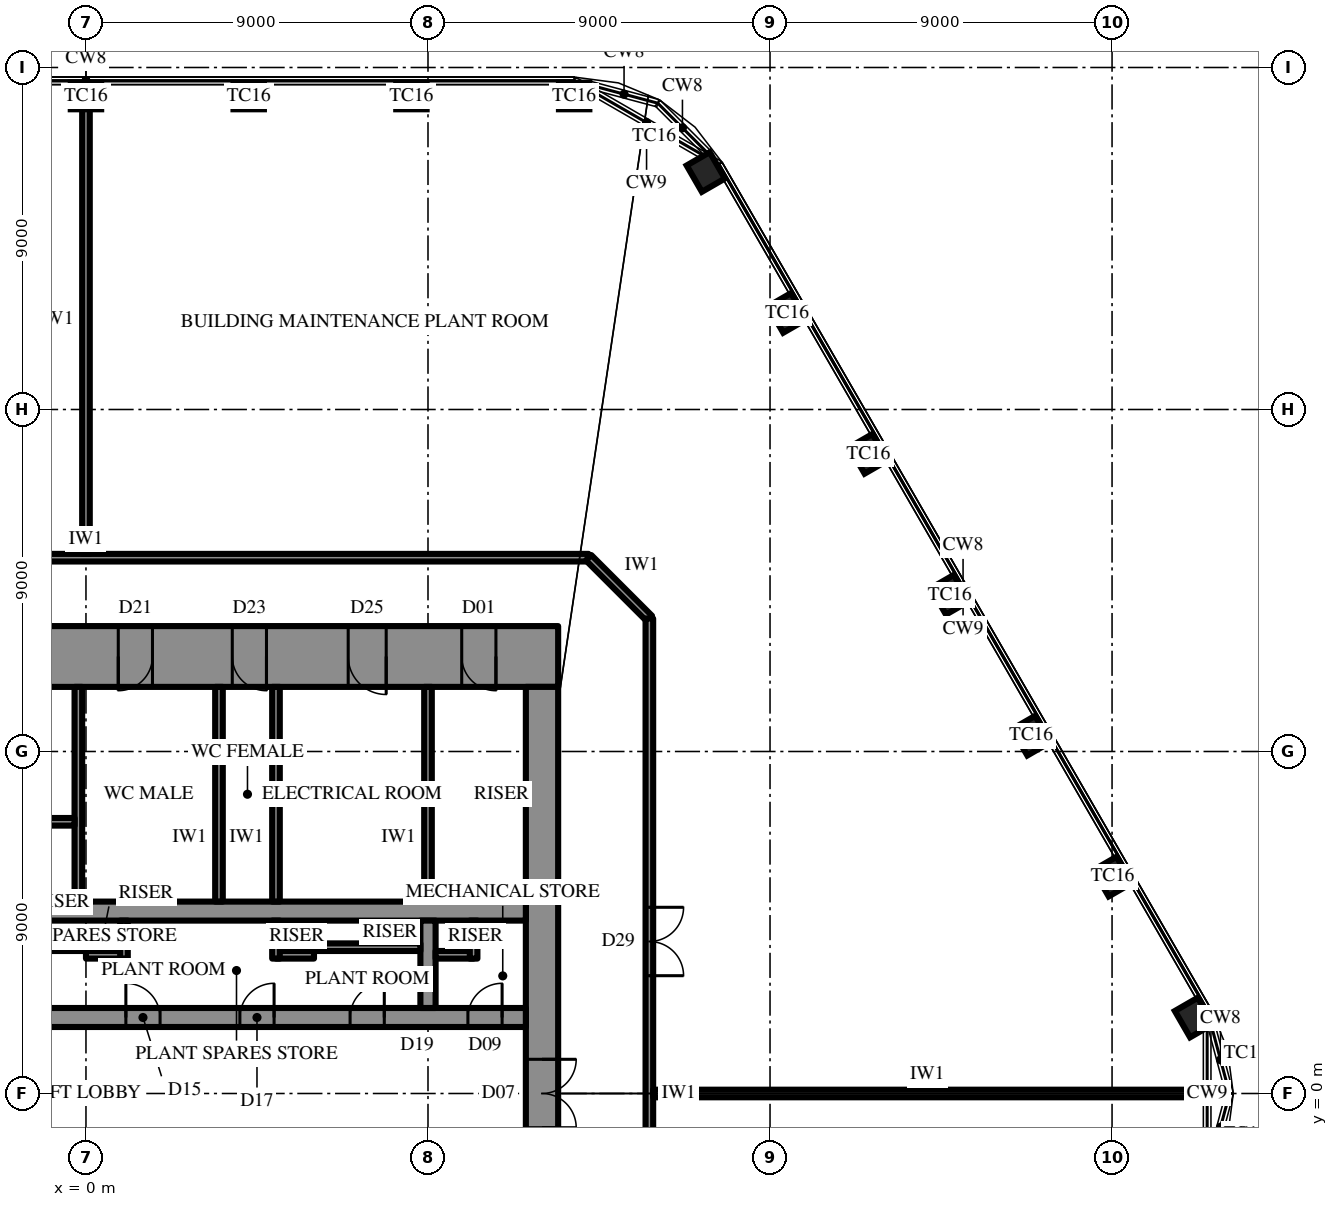
"""IFC4 building model, lengths in metres.
Left out: names, types, materials, properties, quantities, classifications, styles, units other than length and angle.
Written with IfcOpenShell. Run it as: python <this file> out.ifc"""

import sys

from ifc_helpers import new_model, si_unit, direction, frame, frame_2d, origin, origin_2d, place, context, subcontext, project, spatial, rectangle, extrude, element, fill, save


model = new_model("IFC4")
c1 = context("Model", 3, precision=1e-05, world=origin(), true_north=direction((0.0, 1.0)))
c2 = subcontext(c1, "Body", "Model", "MODEL_VIEW")
j1 = project(units=[si_unit("LENGTHUNIT", "METRE"), si_unit("PLANEANGLEUNIT", "RADIAN")], contexts=[c1])
p1 = place(None, origin())
s1 = spatial("IfcSite", under=j1, at=p1, CompositionType="ELEMENT")
p2 = place(p1, origin())
s2 = spatial("IfcBuilding", under=s1, at=p2, CompositionType="ELEMENT")
p3 = place(p2, frame((0.0, 0.0, 402.3)))
s3 = spatial("IfcBuildingStorey", under=s2, at=p3, CompositionType="ELEMENT", Elevation=402.3)
for number, where, z_axis, x_axis in (
    (1, (29.156, 2.0, 0.0), (0.0, 0.0, 1.0), (-0.5, 0.866, 0.0)),
    (2, (27.015, 5.708, 0.0), (0.0, 0.0, 1.0), (-0.5, 0.866, 0.0)),
    (3, (24.874, 9.417, 0.0), (0.0, 0.0, 1.0), (-0.5, 0.866, 0.0)),
    (4, (22.733, 13.125, 0.0), (0.0, 0.0, 1.0), (-0.5, 0.866, 0.0)),
    (5, (20.592, 16.833, 0.0), (0.0, 0.0, 1.0), (-0.5, 0.866, 0.0)),
    (6, (18.451, 20.542, 0.0), (0.0, 0.0, 1.0), (-0.5, 0.866, 0.0)),
    (7, (16.31, 24.25, 0.0), (0.0, 0.0, 1.0), (-0.5, 0.866, 0.0)),
    (8, (12.846, 26.25, 0.0), (0.0, 0.0, 1.0), (-1.0, 0.0, 0.0)),
    (9, (8.564, 26.25, 0.0), (0.0, 0.0, 1.0), (-1.0, 0.0, 0.0)),
    (10, (4.282, 26.25, 0.0), (0.0, 0.0, 1.0), (-1.0, 0.0, 0.0)),
    (11, (0.0, 26.25, 0.0), (0.0, 0.0, 1.0), (-1.0, 0.0, 0.0)),
):
    element("IfcColumn", number, at=place(p3, frame(where, z_axis=z_axis, x_axis=x_axis)), inside=s3, PredefinedType="COLUMN", context=c2, shape_type="SweptSolid", body=[
        extrude(rectangle(XDim=0.8, YDim=0.7, at=origin_2d()), origin(), (0.0, 0.0, 1.0), 6.0),
    ])
p4 = place(p3, frame((-12.425, 11.5, 0.0), z_axis=(0.0, 0.0, 1.0), x_axis=(1.0, 0.0, 0.0)))
e12 = element("IfcWall", 12, at=p4, inside=s3, PredefinedType="SHEAR", context=c2, shape_type="SweptSolid", body=[
    extrude(rectangle(XDim=24.85, YDim=1.6, at=frame_2d((12.425, 0.0))), origin(), (0.0, 0.0, 1.0), 6.0),
])
p5 = place(p4, frame((13.275, 0.0, 0.0)))
e13 = element("IfcOpeningElement", 13, at=p5, cuts=e12, PredefinedType="OPENING", context=c2, shape_type="SweptSolid", body=[
    extrude(rectangle(XDim=0.9, YDim=2.2, at=frame_2d((0.45, 1.1))), frame((0.0, 0.81, 0.0), z_axis=(0.0, -1.0, 0.0), x_axis=(1.0, 0.0, 0.0)), (0.0, 0.0, 1.0), 1.62),
])
p6 = place(p4, frame((16.275, 0.0, 0.0)))
e14 = element("IfcOpeningElement", 14, at=p6, cuts=e12, PredefinedType="OPENING", context=c2, shape_type="SweptSolid", body=[
    extrude(rectangle(XDim=0.9, YDim=2.2, at=frame_2d((0.45, 1.1))), frame((0.0, 0.81, 0.0), z_axis=(0.0, -1.0, 0.0), x_axis=(1.0, 0.0, 0.0)), (0.0, 0.0, 1.0), 1.62),
])
p7 = place(p4, frame((19.325, 0.0, 0.0)))
e15 = element("IfcOpeningElement", 15, at=p7, cuts=e12, PredefinedType="OPENING", context=c2, shape_type="SweptSolid", body=[
    extrude(rectangle(XDim=1.0, YDim=2.2, at=frame_2d((0.5, 1.1))), frame((0.0, 0.81, 0.0), z_axis=(0.0, -1.0, 0.0), x_axis=(1.0, 0.0, 0.0)), (0.0, 0.0, 1.0), 1.62),
])
p8 = place(p4, frame((1.637, 0.0, 0.0)))
e16 = element("IfcOpeningElement", 16, at=p8, cuts=e12, PredefinedType="OPENING", context=c2, shape_type="SweptSolid", body=[
    extrude(rectangle(XDim=0.9, YDim=2.2, at=frame_2d((0.45, 1.1))), frame((0.0, 0.81, 0.0), z_axis=(0.0, -1.0, 0.0), x_axis=(1.0, 0.0, 0.0)), (0.0, 0.0, 1.0), 1.62),
])
p9 = place(p4, frame((22.312, 0.0, 0.0)))
e17 = element("IfcOpeningElement", 17, at=p9, cuts=e12, PredefinedType="OPENING", context=c2, shape_type="SweptSolid", body=[
    extrude(rectangle(XDim=0.9, YDim=2.2, at=frame_2d((0.45, 1.1))), frame((0.0, 0.81, 0.0), z_axis=(0.0, -1.0, 0.0), x_axis=(1.0, 0.0, 0.0)), (0.0, 0.0, 1.0), 1.62),
])
p10 = place(p3, frame((12.0, -10.7, 0.0), z_axis=(0.0, 0.0, 1.0), x_axis=(0.0, 1.0, 0.0)))
e18 = element("IfcWall", 18, at=p10, inside=s3, PredefinedType="SHEAR", context=c2, shape_type="SweptSolid", body=[
    extrude(rectangle(XDim=21.4, YDim=0.85, at=frame_2d((10.7, 0.0))), origin(), (0.0, 0.0, 1.0), 6.0),
])
p11 = place(p10, frame((9.8, 0.0, 0.0)))
e19 = element("IfcOpeningElement", 19, at=p11, cuts=e18, PredefinedType="OPENING", context=c2, shape_type="SweptSolid", body=[
    extrude(rectangle(XDim=1.8, YDim=2.4, at=frame_2d((0.9, 1.2))), frame((0.0, 0.435, 0.0), z_axis=(0.0, -1.0, 0.0), x_axis=(1.0, 0.0, 0.0)), (0.0, 0.0, 1.0), 0.87),
])
p12 = place(p3, frame((-3.2, 2.0, 0.0), z_axis=(0.0, 0.0, 1.0), x_axis=(1.0, 0.0, 0.0)))
e20 = element("IfcWall", 20, at=p12, inside=s3, PredefinedType="SHEAR", context=c2, shape_type="SweptSolid", body=[
    extrude(rectangle(XDim=14.775, YDim=0.5, at=frame_2d((7.387, 0.0))), origin(), (0.0, 0.0, 1.0), 6.0),
])
p13 = place(p12, frame((1.35, 0.0, 0.0)))
e21 = element("IfcOpeningElement", 21, at=p13, cuts=e20, PredefinedType="OPENING", context=c2, shape_type="SweptSolid", body=[
    extrude(rectangle(XDim=0.9, YDim=2.2, at=frame_2d((0.45, 1.1))), frame((0.0, 0.26, 0.0), z_axis=(0.0, -1.0, 0.0), x_axis=(1.0, 0.0, 0.0)), (0.0, 0.0, 1.0), 0.52),
])
p14 = place(p12, frame((4.25, 0.0, 0.0)))
e22 = element("IfcOpeningElement", 22, at=p14, cuts=e20, PredefinedType="OPENING", context=c2, shape_type="SweptSolid", body=[
    extrude(rectangle(XDim=0.9, YDim=2.2, at=frame_2d((0.45, 1.1))), frame((0.0, 0.26, 0.0), z_axis=(0.0, -1.0, 0.0), x_axis=(1.0, 0.0, 0.0)), (0.0, 0.0, 1.0), 0.52),
])
p15 = place(p12, frame((7.25, 0.0, 0.0)))
e23 = element("IfcOpeningElement", 23, at=p15, cuts=e20, PredefinedType="OPENING", context=c2, shape_type="SweptSolid", body=[
    extrude(rectangle(XDim=0.9, YDim=2.2, at=frame_2d((0.45, 1.1))), frame((0.0, 0.26, 0.0), z_axis=(0.0, -1.0, 0.0), x_axis=(1.0, 0.0, 0.0)), (0.0, 0.0, 1.0), 0.52),
])
p16 = place(p12, frame((10.15, 0.0, 0.0)))
e24 = element("IfcOpeningElement", 24, at=p16, cuts=e20, PredefinedType="OPENING", context=c2, shape_type="SweptSolid", body=[
    extrude(rectangle(XDim=0.9, YDim=2.2, at=frame_2d((0.45, 1.1))), frame((0.0, 0.26, 0.0), z_axis=(0.0, -1.0, 0.0), x_axis=(1.0, 0.0, 0.0)), (0.0, 0.0, 1.0), 0.52),
])
p17 = place(p12, frame((13.25, 0.0, 0.0)))
e25 = element("IfcOpeningElement", 25, at=p17, cuts=e20, PredefinedType="OPENING", context=c2, shape_type="SweptSolid", body=[
    extrude(rectangle(XDim=0.9, YDim=2.2, at=frame_2d((0.45, 1.1))), frame((0.0, 0.26, 0.0), z_axis=(0.0, -1.0, 0.0), x_axis=(1.0, 0.0, 0.0)), (0.0, 0.0, 1.0), 0.52),
])
p18 = place(p3, frame((-11.575, 4.8, 0.0), z_axis=(0.0, 0.0, 1.0), x_axis=(1.0, 0.0, 0.0)))
e26 = element("IfcWall", 26, at=p18, inside=s3, PredefinedType="SHEAR", context=c2, shape_type="SweptSolid", body=[
    extrude(rectangle(XDim=23.15, YDim=0.5, at=frame_2d((11.575, 0.0))), origin(), (0.0, 0.0, 1.0), 6.0),
])
p19 = place(p18, frame((6.475, 0.0, 0.0)))
e27 = element("IfcOpeningElement", 27, at=p19, cuts=e26, PredefinedType="OPENING", context=c2, shape_type="SweptSolid", body=[
    extrude(rectangle(XDim=1.2, YDim=2.2, at=frame_2d((0.6, 1.1))), frame((0.0, 0.26, 0.0), z_axis=(0.0, -1.0, 0.0), x_axis=(1.0, 0.0, 0.0)), (0.0, 0.0, 1.0), 0.52),
])
p20 = place(p18, frame((3.475, 0.0, 0.0)))
e28 = element("IfcOpeningElement", 28, at=p20, cuts=e26, PredefinedType="OPENING", context=c2, shape_type="SweptSolid", body=[
    extrude(rectangle(XDim=1.2, YDim=2.2, at=frame_2d((0.6, 1.1))), frame((0.0, 0.26, 0.0), z_axis=(0.0, -1.0, 0.0), x_axis=(1.0, 0.0, 0.0)), (0.0, 0.0, 1.0), 0.52),
])
p21 = place(p3, frame((9.0, 2.25, 0.0), z_axis=(0.0, 0.0, 1.0), x_axis=(0.0, 1.0, 0.0)))
e29 = element("IfcWall", 29, at=p21, inside=s3, PredefinedType="SHEAR", context=c2, shape_type="SweptSolid", body=[
    extrude(rectangle(XDim=2.3, YDim=0.4, at=frame_2d((1.15, 0.0))), origin(), (0.0, 0.0, 1.0), 6.0),
])
p22 = place(p3, frame((-0.2, 5.05, 0.0), z_axis=(0.0, 0.0, 1.0), x_axis=(0.0, 1.0, 0.0)))
e30 = element("IfcWall", 30, at=p22, inside=s3, PredefinedType="SHEAR", context=c2, shape_type="SweptSolid", body=[
    extrude(rectangle(XDim=5.65, YDim=0.2, at=frame_2d((2.825, 0.0))), origin(), (0.0, 0.0, 1.0), 6.0),
])
p23 = place(p3, frame((-8.9, 7.15, 0.0), z_axis=(0.0, 0.0, 1.0), x_axis=(1.0, 0.0, 0.0)))
e31 = element("IfcWall", 31, at=p23, inside=s3, PredefinedType="SHEAR", context=c2, shape_type="SweptSolid", body=[
    extrude(rectangle(XDim=8.6, YDim=0.2, at=frame_2d((4.3, 0.0))), origin(), (0.0, 0.0, 1.0), 6.0),
])
p24 = place(p23, frame((0.3, 0.0, 0.0)))
e32 = element("IfcOpeningElement", 32, at=p24, cuts=e31, PredefinedType="OPENING", context=c2, shape_type="SweptSolid", body=[
    extrude(rectangle(XDim=1.0, YDim=2.2, at=frame_2d((0.5, 1.1))), frame((0.0, 0.11, 0.0), z_axis=(0.0, -1.0, 0.0), x_axis=(1.0, 0.0, 0.0)), (0.0, 0.0, 1.0), 0.22),
])
for number, where, z_axis, x_axis in (
    (33, (9.0, 5.05, 0.0), (0.0, 0.0, 1.0), (0.0, 1.0, 0.0)),
    (34, (3.5, 5.05, 0.0), (0.0, 0.0, 1.0), (0.0, 1.0, 0.0)),
    (35, (5.0, 5.05, 0.0), (0.0, 0.0, 1.0), (0.0, 1.0, 0.0)),
):
    element("IfcWall", number, at=place(p3, frame(where, z_axis=z_axis, x_axis=x_axis)), inside=s3, PredefinedType="PARTITIONING", context=c2, shape_type="SweptSolid", body=[
        extrude(rectangle(XDim=5.65, YDim=0.2, at=frame_2d((2.825, 0.0))), origin(), (0.0, 0.0, 1.0), 5.7),
    ])
p25 = place(p3, frame((-2.8, 3.85, 0.0), z_axis=(0.0, 0.0, 1.0), x_axis=(1.0, 0.0, 0.0)))
e36 = element("IfcWall", 36, at=p25, inside=s3, PredefinedType="PARTITIONING", context=c2, shape_type="SweptSolid", body=[
    extrude(rectangle(XDim=2.8, YDim=0.2, at=frame_2d((1.4, 0.0))), origin(), (0.0, 0.0, 1.0), 5.7),
])
for number, where, z_axis, x_axis in (
    (37, (0.0, 3.65, 0.0), (0.0, 0.0, 1.0), (1.0, 0.0, 0.0)),
    (38, (1.0, 3.55, 0.0), (0.0, 0.0, 1.0), (0.0, 1.0, 0.0)),
    (39, (5.0, 3.65, 0.0), (0.0, 0.0, 1.0), (1.0, 0.0, 0.0)),
    (40, (5.0, 3.55, 0.0), (0.0, 0.0, 1.0), (0.0, 1.0, 0.0)),
):
    element("IfcWall", number, at=place(p3, frame(where, z_axis=z_axis, x_axis=x_axis)), inside=s3, PredefinedType="PARTITIONING", context=c2, shape_type="SweptSolid", body=[
        extrude(rectangle(XDim=1.0, YDim=0.2, at=frame_2d((0.5, 0.0))), origin(), (0.0, 0.0, 1.0), 5.7),
    ])
p26 = place(p3, frame((6.0, 3.85, 0.0), z_axis=(0.0, 0.0, 1.0), x_axis=(1.0, 0.0, 0.0)))
e41 = element("IfcWall", 41, at=p26, inside=s3, PredefinedType="PARTITIONING", context=c2, shape_type="SweptSolid", body=[
    extrude(rectangle(XDim=2.8, YDim=0.2, at=frame_2d((1.4, 0.0))), origin(), (0.0, 0.0, 1.0), 5.7),
])
for number, where, z_axis, x_axis in (
    (42, (9.2, 3.65, 0.0), (0.0, 0.0, 1.0), (1.0, 0.0, 0.0)),
    (43, (10.2, 3.55, 0.0), (0.0, 0.0, 1.0), (0.0, 1.0, 0.0)),
):
    element("IfcWall", number, at=place(p3, frame(where, z_axis=z_axis, x_axis=x_axis)), inside=s3, PredefinedType="PARTITIONING", context=c2, shape_type="SweptSolid", body=[
        extrude(rectangle(XDim=1.0, YDim=0.2, at=frame_2d((0.5, 0.0))), origin(), (0.0, 0.0, 1.0), 5.7),
    ])
p27 = place(p3, frame((-13.225, 14.1, 0.0), z_axis=(0.0, 0.0, 1.0), x_axis=(1.0, 0.0, 0.0)))
e44 = element("IfcWall", 44, at=p27, inside=s3, PredefinedType="PARTITIONING", context=c2, shape_type="SweptSolid", body=[
    extrude(rectangle(XDim=26.45, YDim=0.2, at=frame_2d((13.225, 0.0))), origin(), (0.0, 0.0, 1.0), 5.7),
])
p28 = place(p27, frame((6.113, 0.0, 0.0)))
e45 = element("IfcOpeningElement", 45, at=p28, cuts=e44, PredefinedType="OPENING", context=c2, shape_type="SweptSolid", body=[
    extrude(rectangle(XDim=1.0, YDim=2.2, at=frame_2d((0.5, 1.1))), frame((0.0, 0.11, 0.0), z_axis=(0.0, -1.0, 0.0), x_axis=(1.0, 0.0, 0.0)), (0.0, 0.0, 1.0), 0.22),
])
p29 = place(p3, frame((13.225, 14.1, 0.0), z_axis=(0.0, 0.0, 1.0), x_axis=(0.707052830339, -0.707160727918, 0.0)))
e46 = element("IfcWall", 46, at=p29, inside=s3, PredefinedType="PARTITIONING", context=c2, shape_type="SweptSolid", body=[
    extrude(rectangle(XDim=2.263, YDim=0.2, at=frame_2d((1.131, 0.0))), origin(), (0.0, 0.0, 1.0), 5.7),
])
p30 = place(p3, frame((14.825, 12.5, 0.0), z_axis=(0.0, 0.0, 1.0), x_axis=(0.0, -1.0, 0.0)))
e47 = element("IfcWall", 47, at=p30, inside=s3, PredefinedType="PARTITIONING", context=c2, shape_type="SweptSolid", body=[
    extrude(rectangle(XDim=25.0, YDim=0.2, at=frame_2d((12.5, 0.0))), origin(), (0.0, 0.0, 1.0), 5.7),
])
p31 = place(p30, frame((7.6, 0.0, 0.0)))
e48 = element("IfcOpeningElement", 48, at=p31, cuts=e47, PredefinedType="OPENING", context=c2, shape_type="SweptSolid", body=[
    extrude(rectangle(XDim=1.8, YDim=2.4, at=frame_2d((0.9, 1.2))), frame((0.0, 0.11, 0.0), z_axis=(0.0, -1.0, 0.0), x_axis=(1.0, 0.0, 0.0)), (0.0, 0.0, 1.0), 0.22),
])
p32 = place(p30, frame((15.6, 0.0, 0.0)))
e49 = element("IfcOpeningElement", 49, at=p32, cuts=e47, PredefinedType="OPENING", context=c2, shape_type="SweptSolid", body=[
    extrude(rectangle(XDim=1.8, YDim=2.4, at=frame_2d((0.9, 1.2))), frame((0.0, 0.11, 0.0), z_axis=(0.0, -1.0, 0.0), x_axis=(1.0, 0.0, 0.0)), (0.0, 0.0, 1.0), 0.22),
])
p33 = place(p3, frame((0.0, 14.2, 0.0), z_axis=(0.0, 0.0, 1.0), x_axis=(0.0, 1.0, 0.0)))
e50 = element("IfcWall", 50, at=p33, inside=s3, PredefinedType="PARTITIONING", context=c2, shape_type="SweptSolid", body=[
    extrude(rectangle(XDim=12.36, YDim=0.2, at=frame_2d((6.18, 0.0))), origin(), (0.0, 0.0, 1.0), 4.692),
])
p34 = place(p3, frame((14.925, 0.0, 0.0), z_axis=(0.0, 0.0, 1.0), x_axis=(1.0, 0.0, 0.0)))
e51 = element("IfcWall", 51, at=p34, inside=s3, PredefinedType="PARTITIONING", context=c2, shape_type="SweptSolid", body=[
    extrude(rectangle(XDim=14.422, YDim=0.2, at=frame_2d((7.211, 0.0))), origin(), (0.0, 0.0, 1.0), 4.664),
])
p35 = place(p3, frame((29.347, 0.0, 0.0), z_axis=(0.0, 0.0, 1.0), x_axis=(1.0, 0.0, 0.0)))
e52 = element("IfcWall", 52, at=p35, inside=s3, PredefinedType="PARTITIONING", context=c2, shape_type="SweptSolid", body=[
    extrude(rectangle(XDim=0.657, YDim=0.2, at=frame_2d((0.328, 0.0))), origin(), (0.0, 0.0, 1.0), 5.7),
])
p36 = place(p11, frame((1.8, 0.0, 0.0), z_axis=(0.0, 0.0, 1.0), x_axis=(-1.0, 0.0, 0.0)))
e53 = element("IfcDoor", 53, at=p36, inside=s3, OperationType="DOUBLE_DOOR_SINGLE_SWING", PredefinedType="DOOR", context=c2, shape_type="SweptSolid", body=[
    extrude(rectangle(XDim=1.8, YDim=2.4, at=frame_2d((0.9, 1.2))), frame((0.0, 0.025, 0.0), z_axis=(0.0, -1.0, 0.0), x_axis=(1.0, 0.0, 0.0)), (0.0, 0.0, 1.0), 0.05),
])
fill(e19, e53)
p37 = place(p5, frame((0.9, 0.0, 0.0), z_axis=(0.0, 0.0, 1.0), x_axis=(-1.0, 0.0, 0.0)))
e54 = element("IfcDoor", 54, at=p37, inside=s3, OperationType="SINGLE_SWING_LEFT", PredefinedType="DOOR", context=c2, shape_type="SweptSolid", body=[
    extrude(rectangle(XDim=0.9, YDim=2.2, at=frame_2d((0.45, 1.1))), frame((0.0, 0.025, 0.0), z_axis=(0.0, -1.0, 0.0), x_axis=(1.0, 0.0, 0.0)), (0.0, 0.0, 1.0), 0.05),
])
fill(e13, e54)
p38 = place(p6, frame((0.9, 0.0, 0.0), z_axis=(0.0, 0.0, 1.0), x_axis=(-1.0, 0.0, 0.0)))
e55 = element("IfcDoor", 55, at=p38, inside=s3, OperationType="SINGLE_SWING_RIGHT", PredefinedType="DOOR", context=c2, shape_type="SweptSolid", body=[
    extrude(rectangle(XDim=0.9, YDim=2.2, at=frame_2d((0.45, 1.1))), frame((0.0, 0.025, 0.0), z_axis=(0.0, -1.0, 0.0), x_axis=(1.0, 0.0, 0.0)), (0.0, 0.0, 1.0), 0.05),
])
fill(e14, e55)
p39 = place(p7, frame((1.0, 0.0, 0.0), z_axis=(0.0, 0.0, 1.0), x_axis=(-1.0, 0.0, 0.0)))
e56 = element("IfcDoor", 56, at=p39, inside=s3, OperationType="SINGLE_SWING_RIGHT", PredefinedType="DOOR", context=c2, shape_type="SweptSolid", body=[
    extrude(rectangle(XDim=1.0, YDim=2.2, at=frame_2d((0.5, 1.1))), frame((0.0, 0.025, 0.0), z_axis=(0.0, -1.0, 0.0), x_axis=(1.0, 0.0, 0.0)), (0.0, 0.0, 1.0), 0.05),
])
fill(e15, e56)
p40 = place(p9, frame((0.9, 0.0, 0.0), z_axis=(0.0, 0.0, 1.0), x_axis=(-1.0, 0.0, 0.0)))
e57 = element("IfcDoor", 57, at=p40, inside=s3, OperationType="SINGLE_SWING_RIGHT", PredefinedType="DOOR", context=c2, shape_type="SweptSolid", body=[
    extrude(rectangle(XDim=0.9, YDim=2.2, at=frame_2d((0.45, 1.1))), frame((0.0, 0.025, 0.0), z_axis=(0.0, -1.0, 0.0), x_axis=(1.0, 0.0, 0.0)), (0.0, 0.0, 1.0), 0.05),
])
fill(e17, e57)
p41 = place(p14, origin())
e58 = element("IfcDoor", 58, at=p41, inside=s3, OperationType="SINGLE_SWING_RIGHT", PredefinedType="DOOR", context=c2, shape_type="SweptSolid", body=[
    extrude(rectangle(XDim=0.9, YDim=2.2, at=frame_2d((0.45, 1.1))), frame((0.0, 0.025, 0.0), z_axis=(0.0, -1.0, 0.0), x_axis=(1.0, 0.0, 0.0)), (0.0, 0.0, 1.0), 0.05),
])
fill(e22, e58)
p42 = place(p15, origin())
e59 = element("IfcDoor", 59, at=p42, inside=s3, OperationType="SINGLE_SWING_LEFT", PredefinedType="DOOR", context=c2, shape_type="SweptSolid", body=[
    extrude(rectangle(XDim=0.9, YDim=2.2, at=frame_2d((0.45, 1.1))), frame((0.0, 0.025, 0.0), z_axis=(0.0, -1.0, 0.0), x_axis=(1.0, 0.0, 0.0)), (0.0, 0.0, 1.0), 0.05),
])
fill(e23, e59)
p43 = place(p16, origin())
e60 = element("IfcDoor", 60, at=p43, inside=s3, OperationType="SINGLE_SWING_LEFT", PredefinedType="DOOR", context=c2, shape_type="SweptSolid", body=[
    extrude(rectangle(XDim=0.9, YDim=2.2, at=frame_2d((0.45, 1.1))), frame((0.0, 0.025, 0.0), z_axis=(0.0, -1.0, 0.0), x_axis=(1.0, 0.0, 0.0)), (0.0, 0.0, 1.0), 0.05),
])
fill(e24, e60)
p44 = place(p17, origin())
e61 = element("IfcDoor", 61, at=p44, inside=s3, OperationType="SINGLE_SWING_LEFT", PredefinedType="DOOR", context=c2, shape_type="SweptSolid", body=[
    extrude(rectangle(XDim=0.9, YDim=2.2, at=frame_2d((0.45, 1.1))), frame((0.0, 0.025, 0.0), z_axis=(0.0, -1.0, 0.0), x_axis=(1.0, 0.0, 0.0)), (0.0, 0.0, 1.0), 0.05),
])
fill(e25, e61)
p45 = place(p31, origin())
e62 = element("IfcDoor", 62, at=p45, inside=s3, OperationType="DOUBLE_DOOR_SINGLE_SWING", PredefinedType="DOOR", context=c2, shape_type="SweptSolid", body=[
    extrude(rectangle(XDim=1.8, YDim=2.4, at=frame_2d((0.9, 1.2))), frame((0.0, 0.025, 0.0), z_axis=(0.0, -1.0, 0.0), x_axis=(1.0, 0.0, 0.0)), (0.0, 0.0, 1.0), 0.05),
])
fill(e48, e62)
save(model, sys.argv[1])
